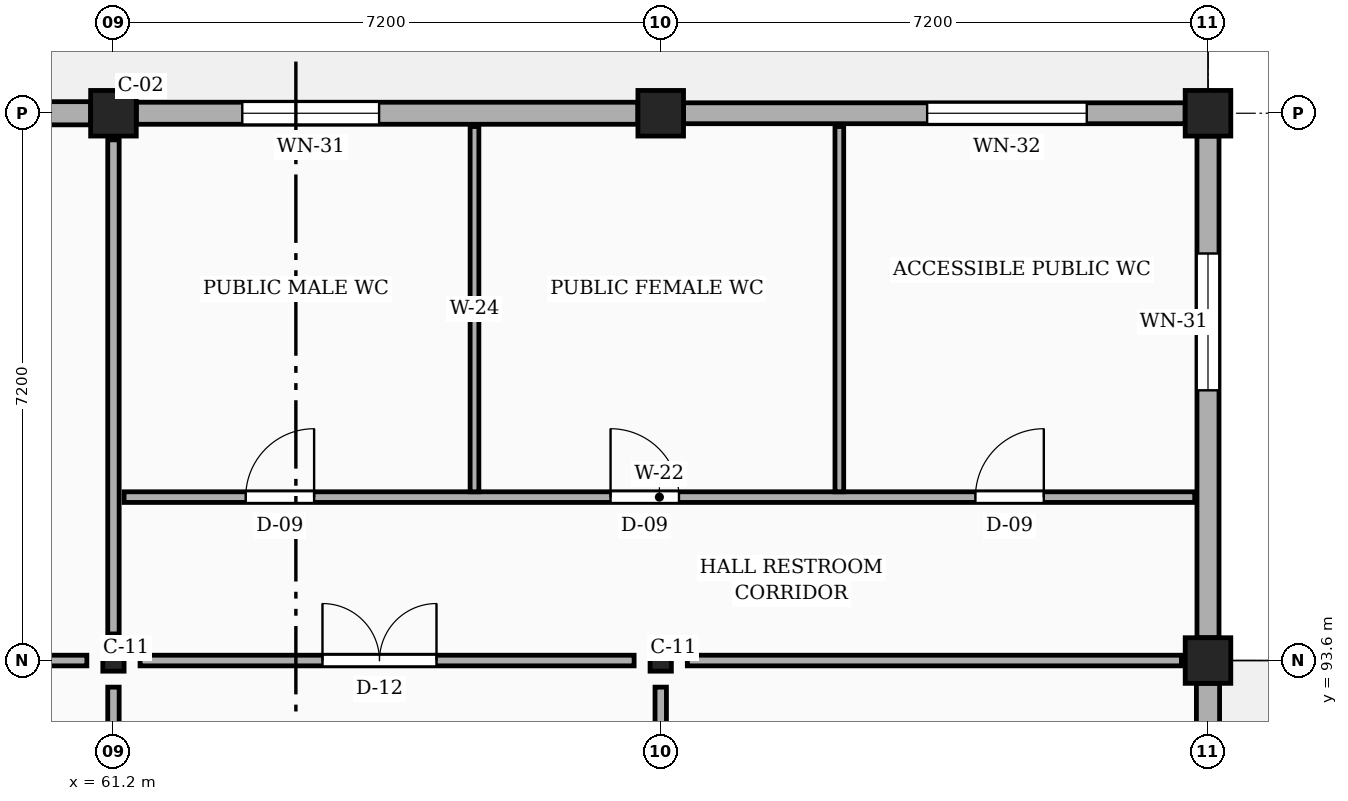
"""IFC4 building model, lengths in metres.
Left out: names, types, materials, properties, quantities, classifications, styles, units other than length and angle.
Written with IfcOpenShell. Run it as: python <this file> out.ifc"""

import sys

from ifc_helpers import new_model, si_unit, direction, frame, frame_2d, origin, origin_2d, place, context, subcontext, project, spatial, rectangle, i_section, extrude, element, fill, save


model = new_model("IFC4")
c1 = context("Model", 3, precision=1e-05, world=origin(), true_north=direction((0.0, 1.0)))
c2 = subcontext(c1, "Body", "Model", "MODEL_VIEW")
j1 = project(units=[si_unit("LENGTHUNIT", "METRE"), si_unit("PLANEANGLEUNIT", "RADIAN")], contexts=[c1])
p1 = place(None, origin())
s1 = spatial("IfcSite", under=j1, at=p1, CompositionType="ELEMENT")
p2 = place(p1, origin())
s2 = spatial("IfcBuilding", under=s1, at=p2, CompositionType="ELEMENT")
p3 = place(p2, origin())
s3 = spatial("IfcBuildingStorey", under=s2, at=p3, CompositionType="ELEMENT", Elevation=0.0)
p4 = place(p3, frame((61.2, 93.6, 0.0), z_axis=(0.0, 0.0, 1.0), x_axis=(1.0, 0.0, 0.0)))
e1 = element("IfcColumn", 1, at=p4, inside=s3, PredefinedType="COLUMN", context=c2, shape_type="SweptSolid", body=[
    extrude(i_section(OverallWidth=0.28, OverallDepth=0.28, WebThickness=0.01, FlangeThickness=0.018, FilletRadius=0.024, at=origin_2d()), origin(), (0.0, 0.0, 1.0), 8.1),
])
p5 = place(p3, frame((61.2, 100.8, 0.0), z_axis=(0.0, 0.0, 1.0), x_axis=(1.0, 0.0, 0.0)))
e2 = element("IfcColumn", 2, at=p5, inside=s3, PredefinedType="COLUMN", context=c2, shape_type="SweptSolid", body=[
    extrude(rectangle(XDim=0.6, YDim=0.6, at=origin_2d()), origin(), (0.0, 0.0, 1.0), 8.1),
])
p6 = place(p3, frame((68.4, 93.6, 0.0), z_axis=(0.0, 0.0, 1.0), x_axis=(1.0, 0.0, 0.0)))
e3 = element("IfcColumn", 3, at=p6, inside=s3, PredefinedType="COLUMN", context=c2, shape_type="SweptSolid", body=[
    extrude(i_section(OverallWidth=0.28, OverallDepth=0.28, WebThickness=0.01, FlangeThickness=0.018, FilletRadius=0.024, at=origin_2d()), origin(), (0.0, 0.0, 1.0), 8.1),
])
p7 = place(p3, frame((68.4, 100.8, 0.0), z_axis=(0.0, 0.0, 1.0), x_axis=(1.0, 0.0, 0.0)))
e4 = element("IfcColumn", 4, at=p7, inside=s3, PredefinedType="COLUMN", context=c2, shape_type="SweptSolid", body=[
    extrude(rectangle(XDim=0.6, YDim=0.6, at=origin_2d()), origin(), (0.0, 0.0, 1.0), 8.1),
])
p8 = place(p3, frame((75.6, 93.6, 0.0), z_axis=(0.0, 0.0, 1.0), x_axis=(1.0, 0.0, 0.0)))
e5 = element("IfcColumn", 5, at=p8, inside=s3, PredefinedType="COLUMN", context=c2, shape_type="SweptSolid", body=[
    extrude(rectangle(XDim=0.6, YDim=0.6, at=origin_2d()), origin(), (0.0, 0.0, 1.0), 9.295),
])
p9 = place(p3, frame((75.6, 100.8, 0.0), z_axis=(0.0, 0.0, 1.0), x_axis=(1.0, 0.0, 0.0)))
e6 = element("IfcColumn", 6, at=p9, inside=s3, PredefinedType="COLUMN", context=c2, shape_type="SweptSolid", body=[
    extrude(rectangle(XDim=0.6, YDim=0.6, at=origin_2d()), origin(), (0.0, 0.0, 1.0), 7.745),
])
p10 = place(p3, frame((75.6, 86.7, 0.0), z_axis=(0.0, 0.0, 1.0), x_axis=(0.0, 1.0, 0.0)))
e7 = element("IfcWall", 7, at=p10, inside=s3, PredefinedType="SOLIDWALL", context=c2, shape_type="SweptSolid", body=[
    extrude(rectangle(XDim=6.6, YDim=0.305, at=frame_2d((3.3, 0.0))), origin(), (0.0, 0.0, 1.0), 6.95),
])
p11 = place(p10, frame((2.5, 0.0, 0.0)))
e8 = element("IfcOpeningElement", 8, at=p11, cuts=e7, PredefinedType="OPENING", context=c2, shape_type="SweptSolid", body=[
    extrude(rectangle(XDim=1.6, YDim=2.25, at=frame_2d((0.8, 1.125))), frame((0.0, 0.163, 0.0), z_axis=(0.0, -1.0, 0.0), x_axis=(1.0, 0.0, 0.0)), (0.0, 0.0, 1.0), 0.325),
])
p12 = place(p3, frame((75.6, 93.9, 0.0), z_axis=(0.0, 0.0, 1.0), x_axis=(0.0, 1.0, 0.0)))
e9 = element("IfcWall", 9, at=p12, inside=s3, PredefinedType="SOLIDWALL", context=c2, shape_type="SweptSolid", body=[
    extrude(rectangle(XDim=6.6, YDim=0.29, at=frame_2d((3.3, 0.0))), origin(), (0.0, 0.0, 1.0), 6.95),
])
p13 = place(p12, frame((3.255, 0.0, 0.85)))
e10 = element("IfcOpeningElement", 10, at=p13, cuts=e9, PredefinedType="OPENING", context=c2, shape_type="SweptSolid", body=[
    extrude(rectangle(XDim=1.8, YDim=2.1, at=frame_2d((0.9, 1.05))), frame((0.0, 0.155, 0.0), z_axis=(0.0, -1.0, 0.0), x_axis=(1.0, 0.0, 0.0)), (0.0, 0.0, 1.0), 0.31),
])
p14 = place(p3, frame((75.3, 100.8, 0.0), z_axis=(0.0, 0.0, 1.0), x_axis=(-1.0, 0.0, 0.0)))
e11 = element("IfcWall", 11, at=p14, inside=s3, PredefinedType="SOLIDWALL", context=c2, shape_type="SweptSolid", body=[
    extrude(rectangle(XDim=6.6, YDim=0.275, at=frame_2d((3.3, 0.0))), origin(), (0.0, 0.0, 1.0), 6.525),
])
p15 = place(p14, frame((1.295, 0.0, 0.85)))
e12 = element("IfcOpeningElement", 12, at=p15, cuts=e11, PredefinedType="OPENING", context=c2, shape_type="SweptSolid", body=[
    extrude(rectangle(XDim=2.1, YDim=2.1, at=frame_2d((1.05, 1.05))), frame((0.0, 0.147, 0.0), z_axis=(0.0, -1.0, 0.0), x_axis=(1.0, 0.0, 0.0)), (0.0, 0.0, 1.0), 0.295),
])
p16 = place(p3, frame((68.1, 100.8, 0.0), z_axis=(0.0, 0.0, 1.0), x_axis=(-1.0, 0.0, 0.0)))
e13 = element("IfcWall", 13, at=p16, inside=s3, PredefinedType="SOLIDWALL", context=c2, shape_type="SweptSolid", body=[
    extrude(rectangle(XDim=6.6, YDim=0.29, at=frame_2d((3.3, 0.0))), origin(), (0.0, 0.0, 1.0), 6.525),
])
p17 = place(p16, frame((3.405, 0.0, 0.85)))
e14 = element("IfcOpeningElement", 14, at=p17, cuts=e13, PredefinedType="OPENING", context=c2, shape_type="SweptSolid", body=[
    extrude(rectangle(XDim=1.8, YDim=2.1, at=frame_2d((0.9, 1.05))), frame((0.0, 0.155, 0.0), z_axis=(0.0, -1.0, 0.0), x_axis=(1.0, 0.0, 0.0)), (0.0, 0.0, 1.0), 0.31),
])
p18 = place(p3, frame((60.9, 100.8, 0.0), z_axis=(0.0, 0.0, 1.0), x_axis=(-1.0, 0.0, 0.0)))
e15 = element("IfcWall", 15, at=p18, inside=s3, PredefinedType="SOLIDWALL", context=c2, shape_type="SweptSolid", body=[
    extrude(rectangle(XDim=6.6, YDim=0.305, at=frame_2d((3.3, 0.0))), origin(), (0.0, 0.0, 1.0), 6.525),
])
p19 = place(p18, frame((2.25, 0.0, 0.85)))
e16 = element("IfcOpeningElement", 16, at=p19, cuts=e15, PredefinedType="OPENING", context=c2, shape_type="SweptSolid", body=[
    extrude(rectangle(XDim=2.1, YDim=2.1, at=frame_2d((1.05, 1.05))), frame((0.0, 0.163, 0.0), z_axis=(0.0, -1.0, 0.0), x_axis=(1.0, 0.0, 0.0)), (0.0, 0.0, 1.0), 0.325),
])
p20 = place(p3, frame((61.2, 86.75, 0.0), z_axis=(0.0, 0.0, 1.0), x_axis=(0.0, 1.0, 0.0)))
e17 = element("IfcWall", 17, at=p20, inside=s3, PredefinedType="PARTITIONING", context=c2, shape_type="SweptSolid", body=[
    extrude(rectangle(XDim=6.5, YDim=0.15, at=frame_2d((3.25, 0.0))), origin(), (0.0, 0.0, 1.0), 4.1),
])
p21 = place(p20, frame((2.4, 0.0, 0.0)))
e18 = element("IfcOpeningElement", 18, at=p21, cuts=e17, PredefinedType="OPENING", context=c2, shape_type="SweptSolid", body=[
    extrude(rectangle(XDim=1.5, YDim=2.25, at=frame_2d((0.75, 1.125))), frame((0.0, 0.085, 0.0), z_axis=(0.0, -1.0, 0.0), x_axis=(1.0, 0.0, 0.0)), (0.0, 0.0, 1.0), 0.17),
])
p22 = place(p3, frame((61.2, 93.95, 0.0), z_axis=(0.0, 0.0, 1.0), x_axis=(0.0, 1.0, 0.0)))
e19 = element("IfcWall", 19, at=p22, inside=s3, PredefinedType="PARTITIONING", context=c2, shape_type="SweptSolid", body=[
    extrude(rectangle(XDim=6.5, YDim=0.15, at=frame_2d((3.25, 0.0))), origin(), (0.0, 0.0, 1.0), 4.1),
])
p23 = place(p3, frame((39.95, 93.6, 0.0), z_axis=(0.0, 0.0, 1.0), x_axis=(1.0, 0.0, 0.0)))
e20 = element("IfcWall", 20, at=p23, inside=s3, PredefinedType="PARTITIONING", context=c2, shape_type="SweptSolid", body=[
    extrude(rectangle(XDim=20.9, YDim=0.14, at=frame_2d((10.45, 0.0))), origin(), (0.0, 0.0, 1.0), 4.1),
])
p24 = place(p23, frame((2.8, 0.0, 0.0)))
e21 = element("IfcOpeningElement", 21, at=p24, cuts=e20, PredefinedType="OPENING", context=c2, shape_type="SweptSolid", body=[
    extrude(rectangle(XDim=1.5, YDim=2.25, at=frame_2d((0.75, 1.125))), frame((0.0, 0.08, 0.0), z_axis=(0.0, -1.0, 0.0), x_axis=(1.0, 0.0, 0.0)), (0.0, 0.0, 1.0), 0.16),
])
p25 = place(p23, frame((15.6, 0.0, 0.0)))
e22 = element("IfcOpeningElement", 22, at=p25, cuts=e20, PredefinedType="OPENING", context=c2, shape_type="SweptSolid", body=[
    extrude(rectangle(XDim=1.5, YDim=2.25, at=frame_2d((0.75, 1.125))), frame((0.0, 0.08, 0.0), z_axis=(0.0, -1.0, 0.0), x_axis=(1.0, 0.0, 0.0)), (0.0, 0.0, 1.0), 0.16),
])
p26 = place(p3, frame((68.4, 86.75, 0.0), z_axis=(0.0, 0.0, 1.0), x_axis=(0.0, 1.0, 0.0)))
e23 = element("IfcWall", 23, at=p26, inside=s3, PredefinedType="PARTITIONING", context=c2, shape_type="SweptSolid", body=[
    extrude(rectangle(XDim=6.5, YDim=0.15, at=frame_2d((3.25, 0.0))), origin(), (0.0, 0.0, 1.0), 4.1),
])
p27 = place(p26, frame((2.5, 0.0, 0.0)))
e24 = element("IfcOpeningElement", 24, at=p27, cuts=e23, PredefinedType="OPENING", context=c2, shape_type="SweptSolid", body=[
    extrude(rectangle(XDim=1.08, YDim=2.15, at=frame_2d((0.54, 1.075))), frame((0.0, 0.085, 0.0), z_axis=(0.0, -1.0, 0.0), x_axis=(1.0, 0.0, 0.0)), (0.0, 0.0, 1.0), 0.17),
])
p28 = place(p3, frame((61.55, 93.6, 0.0), z_axis=(0.0, 0.0, 1.0), x_axis=(1.0, 0.0, 0.0)))
e25 = element("IfcWall", 25, at=p28, inside=s3, PredefinedType="PARTITIONING", context=c2, shape_type="SweptSolid", body=[
    extrude(rectangle(XDim=6.5, YDim=0.14, at=frame_2d((3.25, 0.0))), origin(), (0.0, 0.0, 1.0), 4.1),
])
p29 = place(p28, frame((2.4, 0.0, 0.0)))
e26 = element("IfcOpeningElement", 26, at=p29, cuts=e25, PredefinedType="OPENING", context=c2, shape_type="SweptSolid", body=[
    extrude(rectangle(XDim=1.5, YDim=2.25, at=frame_2d((0.75, 1.125))), frame((0.0, 0.08, 0.0), z_axis=(0.0, -1.0, 0.0), x_axis=(1.0, 0.0, 0.0)), (0.0, 0.0, 1.0), 0.16),
])
p30 = place(p3, frame((68.75, 93.6, 0.0), z_axis=(0.0, 0.0, 1.0), x_axis=(1.0, 0.0, 0.0)))
e27 = element("IfcWall", 27, at=p30, inside=s3, PredefinedType="PARTITIONING", context=c2, shape_type="SweptSolid", body=[
    extrude(rectangle(XDim=6.5, YDim=0.14, at=frame_2d((3.25, 0.0))), origin(), (0.0, 0.0, 1.0), 4.1),
])
p31 = place(p3, frame((61.34, 95.75, 0.0), z_axis=(0.0, 0.0, 1.0), x_axis=(1.0, 0.0, 0.0)))
e28 = element("IfcWall", 28, at=p31, inside=s3, PredefinedType="PARTITIONING", context=c2, shape_type="SweptSolid", body=[
    extrude(rectangle(XDim=14.085, YDim=0.14, at=frame_2d((7.042, 0.0))), origin(), (0.0, 0.0, 1.0), 4.1),
])
p32 = place(p31, frame((1.6, 0.0, 0.0)))
e29 = element("IfcOpeningElement", 29, at=p32, cuts=e28, PredefinedType="OPENING", context=c2, shape_type="SweptSolid", body=[
    extrude(rectangle(XDim=0.9, YDim=2.05, at=frame_2d((0.45, 1.025))), frame((0.0, 0.08, 0.0), z_axis=(0.0, -1.0, 0.0), x_axis=(1.0, 0.0, 0.0)), (0.0, 0.0, 1.0), 0.16),
])
p33 = place(p31, frame((6.4, 0.0, 0.0)))
e30 = element("IfcOpeningElement", 30, at=p33, cuts=e28, PredefinedType="OPENING", context=c2, shape_type="SweptSolid", body=[
    extrude(rectangle(XDim=0.9, YDim=2.05, at=frame_2d((0.45, 1.025))), frame((0.0, 0.08, 0.0), z_axis=(0.0, -1.0, 0.0), x_axis=(1.0, 0.0, 0.0)), (0.0, 0.0, 1.0), 0.16),
])
p34 = place(p31, frame((11.2, 0.0, 0.0)))
e31 = element("IfcOpeningElement", 31, at=p34, cuts=e28, PredefinedType="OPENING", context=c2, shape_type="SweptSolid", body=[
    extrude(rectangle(XDim=0.9, YDim=2.05, at=frame_2d((0.45, 1.025))), frame((0.0, 0.08, 0.0), z_axis=(0.0, -1.0, 0.0), x_axis=(1.0, 0.0, 0.0)), (0.0, 0.0, 1.0), 0.16),
])
for number, where, z_axis, x_axis in (
    (32, (65.95, 95.82, 0.0), (0.0, 0.0, 1.0), (0.0, 1.0, 0.0)),
    (33, (70.75, 95.82, 0.0), (0.0, 0.0, 1.0), (0.0, 1.0, 0.0)),
):
    element("IfcWall", number, at=place(p3, frame(where, z_axis=z_axis, x_axis=x_axis)), inside=s3, PredefinedType="PARTITIONING", context=c2, shape_type="SweptSolid", body=[
        extrude(rectangle(XDim=4.805, YDim=0.115, at=frame_2d((2.402, 0.0))), origin(), (0.0, 0.0, 1.0), 4.1),
    ])
p35 = place(p13, origin())
e34 = element("IfcWindow", 34, at=p35, inside=s3, PartitioningType="SINGLE_PANEL", PredefinedType="WINDOW", context=c2, shape_type="SweptSolid", body=[
    extrude(rectangle(XDim=1.8, YDim=2.1, at=frame_2d((0.9, 1.05))), frame((0.0, 0.03, 0.0), z_axis=(0.0, -1.0, 0.0), x_axis=(1.0, 0.0, 0.0)), (0.0, 0.0, 1.0), 0.06),
])
fill(e10, e34)
p36 = place(p15, origin())
e35 = element("IfcWindow", 35, at=p36, inside=s3, PartitioningType="SINGLE_PANEL", PredefinedType="WINDOW", context=c2, shape_type="SweptSolid", body=[
    extrude(rectangle(XDim=2.1, YDim=2.1, at=frame_2d((1.05, 1.05))), frame((0.0, 0.03, 0.0), z_axis=(0.0, -1.0, 0.0), x_axis=(1.0, 0.0, 0.0)), (0.0, 0.0, 1.0), 0.06),
])
fill(e12, e35)
p37 = place(p17, origin())
e36 = element("IfcWindow", 36, at=p37, inside=s3, PartitioningType="SINGLE_PANEL", PredefinedType="WINDOW", context=c2, shape_type="SweptSolid", body=[
    extrude(rectangle(XDim=1.8, YDim=2.1, at=frame_2d((0.9, 1.05))), frame((0.0, 0.03, 0.0), z_axis=(0.0, -1.0, 0.0), x_axis=(1.0, 0.0, 0.0)), (0.0, 0.0, 1.0), 0.06),
])
fill(e14, e36)
p38 = place(p29, origin())
e37 = element("IfcDoor", 37, at=p38, inside=s3, OperationType="DOUBLE_DOOR_SINGLE_SWING", PredefinedType="DOOR", context=c2, shape_type="SweptSolid", body=[
    extrude(rectangle(XDim=1.5, YDim=2.25, at=frame_2d((0.75, 1.125))), frame((0.0, 0.025, 0.0), z_axis=(0.0, -1.0, 0.0), x_axis=(1.0, 0.0, 0.0)), (0.0, 0.0, 1.0), 0.05),
])
fill(e26, e37)
p39 = place(p32, origin())
e38 = element("IfcDoor", 38, at=p39, inside=s3, OperationType="SINGLE_SWING_RIGHT", PredefinedType="DOOR", context=c2, shape_type="SweptSolid", body=[
    extrude(rectangle(XDim=0.9, YDim=2.05, at=frame_2d((0.45, 1.025))), frame((0.0, 0.025, 0.0), z_axis=(0.0, -1.0, 0.0), x_axis=(1.0, 0.0, 0.0)), (0.0, 0.0, 1.0), 0.05),
])
fill(e29, e38)
p40 = place(p33, origin())
e39 = element("IfcDoor", 39, at=p40, inside=s3, OperationType="SINGLE_SWING_LEFT", PredefinedType="DOOR", context=c2, shape_type="SweptSolid", body=[
    extrude(rectangle(XDim=0.9, YDim=2.05, at=frame_2d((0.45, 1.025))), frame((0.0, 0.025, 0.0), z_axis=(0.0, -1.0, 0.0), x_axis=(1.0, 0.0, 0.0)), (0.0, 0.0, 1.0), 0.05),
])
fill(e30, e39)
p41 = place(p34, origin())
e40 = element("IfcDoor", 40, at=p41, inside=s3, OperationType="SINGLE_SWING_RIGHT", PredefinedType="DOOR", context=c2, shape_type="SweptSolid", body=[
    extrude(rectangle(XDim=0.9, YDim=2.05, at=frame_2d((0.45, 1.025))), frame((0.0, 0.025, 0.0), z_axis=(0.0, -1.0, 0.0), x_axis=(1.0, 0.0, 0.0)), (0.0, 0.0, 1.0), 0.05),
])
fill(e31, e40)
save(model, sys.argv[1])
